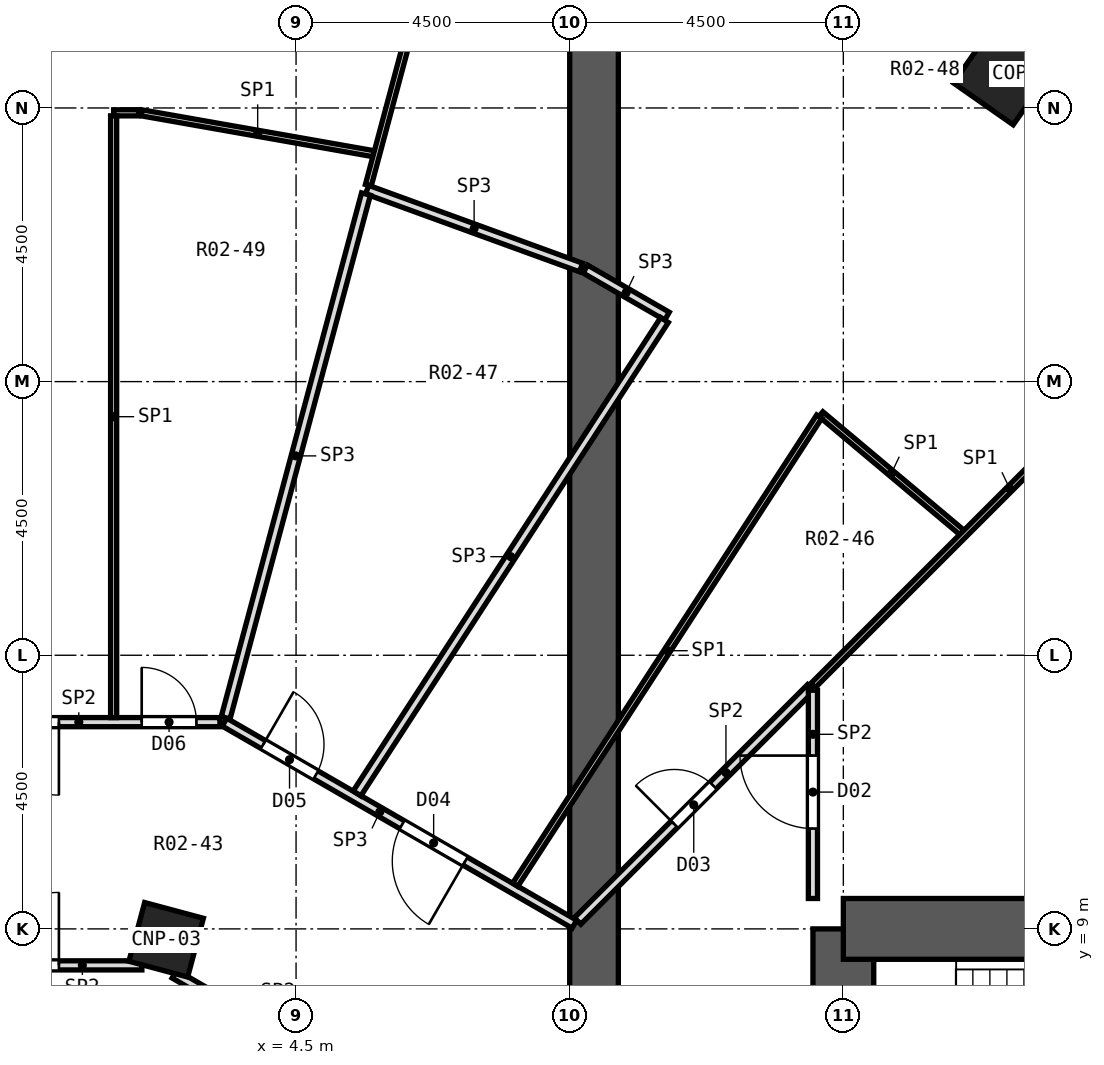
"""IFC4 building model, lengths in metres.
Left out: names, types, materials, properties, quantities, classifications, styles, units other than length and angle.
Written with IfcOpenShell. Run it as: python <this file> out.ifc"""

import sys

from ifc_helpers import new_model, si_unit, direction, frame, frame_2d, origin, origin_2d, place, context, subcontext, project, spatial, rectangle, extrude, element, fill, save


model = new_model("IFC4")
c1 = context("Model", 3, precision=1e-05, world=origin(), true_north=direction((0.0, 1.0)))
c2 = subcontext(c1, "Body", "Model", "MODEL_VIEW")
j1 = project(units=[si_unit("LENGTHUNIT", "METRE"), si_unit("PLANEANGLEUNIT", "RADIAN")], contexts=[c1])
p1 = place(None, origin())
s1 = spatial("IfcSite", under=j1, at=p1, CompositionType="ELEMENT")
p2 = place(p1, origin())
s2 = spatial("IfcBuilding", under=s1, at=p2, CompositionType="ELEMENT")
p3 = place(p2, frame((0.0, 0.0, -4.5)))
s3 = spatial("IfcBuildingStorey", under=s2, at=p3, CompositionType="ELEMENT", Elevation=-4.5)
p4 = place(p3, frame((16.146, 23.059, 0.0), z_axis=(0.0, 0.0, 1.0), x_axis=(0.573576436351, 0.819152044289, 0.0)))
e1 = element("IfcColumn", 1, at=p4, inside=s3, PredefinedType="COLUMN", context=c2, shape_type="SweptSolid", body=[
    extrude(rectangle(XDim=1.2, YDim=1.2, at=origin_2d()), origin(), (0.0, 0.0, 1.0), 4.5),
])
p5 = place(p3, frame((2.364, 8.821, 0.0), z_axis=(0.0, 0.0, 1.0), x_axis=(0.258819045103, 0.965925826289, 0.0)))
e2 = element("IfcColumn", 2, at=p5, inside=s3, PredefinedType="COLUMN", context=c2, shape_type="SweptSolid", body=[
    extrude(rectangle(XDim=1.0, YDim=1.0, at=origin_2d()), origin(), (0.0, 0.0, 1.0), 4.5),
])
p6 = place(p3, frame((13.5, -9.0, 0.0), z_axis=(0.0, 0.0, 1.0), x_axis=(0.0, 1.0, 0.0)))
e3 = element("IfcWall", 3, at=p6, inside=s3, PredefinedType="SHEAR", context=c2, shape_type="SweptSolid", body=[
    extrude(rectangle(XDim=18.0, YDim=1.0, at=frame_2d((9.0, 0.0))), origin(), (0.0, 0.0, 1.0), 4.5),
])
p7 = place(p6, frame((15.4, 0.0, 0.0)))
e4 = element("IfcOpeningElement", 4, at=p7, cuts=e3, PredefinedType="OPENING", context=c2, shape_type="SweptSolid", body=[
    extrude(rectangle(XDim=1.2, YDim=2.1, at=frame_2d((0.6, 1.05))), frame((0.0, 0.512, 0.0), z_axis=(0.0, -1.0, 0.0), x_axis=(1.0, 0.0, 0.0)), (0.0, 0.0, 1.0), 1.024),
])
p8 = place(p6, frame((1.4, 0.0, 0.0)))
e5 = element("IfcOpeningElement", 5, at=p8, cuts=e3, PredefinedType="OPENING", context=c2, shape_type="SweptSolid", body=[
    extrude(rectangle(XDim=1.2, YDim=2.1, at=frame_2d((0.6, 1.05))), frame((0.0, 0.512, 0.0), z_axis=(0.0, -1.0, 0.0), x_axis=(1.0, 0.0, 0.0)), (0.0, 0.0, 1.0), 1.024),
])
p9 = place(p6, frame((7.5, 0.0, 0.0)))
e6 = element("IfcOpeningElement", 6, at=p9, cuts=e3, PredefinedType="OPENING", context=c2, shape_type="SweptSolid", body=[
    extrude(rectangle(XDim=3.0, YDim=2.4, at=frame_2d((1.5, 1.2))), frame((0.0, 0.512, 0.0), z_axis=(0.0, -1.0, 0.0), x_axis=(1.0, 0.0, 0.0)), (0.0, 0.0, 1.0), 1.024),
])
p10 = place(p3, frame((13.5, 9.0, 0.0), z_axis=(0.0, 0.0, 1.0), x_axis=(1.0, 0.0, 0.0)))
e7 = element("IfcWall", 7, at=p10, inside=s3, PredefinedType="SHEAR", context=c2, shape_type="SweptSolid", body=[
    extrude(rectangle(XDim=12.4, YDim=1.0, at=frame_2d((6.2, 0.0))), origin(), (0.0, 0.0, 1.0), 4.5),
])
p11 = place(p3, frame((9.4, -27.077, 0.0), z_axis=(0.0, 0.0, 1.0), x_axis=(0.0, 1.0, 0.0)))
e8 = element("IfcWall", 8, at=p11, inside=s3, PredefinedType="SHEAR", context=c2, shape_type="SweptSolid", body=[
    extrude(rectangle(XDim=54.154, YDim=0.8, at=frame_2d((27.077, 0.0))), origin(), (0.0, 0.0, 1.0), 4.5),
])
p12 = place(p3, frame((13.131, 17.466, 0.0), z_axis=(0.0, 0.0, 1.0), x_axis=(0.765962197231, -0.642885613786, 0.0)))
e9 = element("IfcWall", 9, at=p12, inside=s3, PredefinedType="PARTITIONING", context=c2, shape_type="SweptSolid", body=[
    extrude(rectangle(XDim=3.027, YDim=0.1, at=frame_2d((1.514, 0.0))), origin(), (0.0, 0.0, 1.0), 3.95),
])
p13 = place(p3, frame((2.499, 8.257, 0.0), z_axis=(0.0, 0.0, 1.0), x_axis=(0.865990036525, -0.500061252887, 0.0)))
e10 = element("IfcWall", 10, at=p13, inside=s3, PredefinedType="PARTITIONING", context=c2, shape_type="SweptSolid", body=[
    extrude(rectangle(XDim=3.93, YDim=0.15, at=frame_2d((1.965, 0.0))), origin(), (0.0, 0.0, 1.0), 3.95),
])
p14 = place(p3, frame((3.323, 12.4, 0.0), z_axis=(0.0, 0.0, 1.0), x_axis=(0.865961614908, -0.500110469302, 0.0)))
e11 = element("IfcWall", 11, at=p14, inside=s3, PredefinedType="PARTITIONING", context=c2, shape_type="SweptSolid", body=[
    extrude(rectangle(XDim=6.645, YDim=0.15, at=frame_2d((3.322, 0.0))), origin(), (0.0, 0.0, 1.0), 3.95),
])
p15 = place(p14, frame((3.372, 0.0, 0.0)))
e12 = element("IfcOpeningElement", 12, at=p15, cuts=e11, PredefinedType="OPENING", context=c2, shape_type="SweptSolid", body=[
    extrude(rectangle(XDim=1.2, YDim=2.1, at=frame_2d((0.6, 1.05))), frame((0.0, 0.087, 0.0), z_axis=(0.0, -1.0, 0.0), x_axis=(1.0, 0.0, 0.0)), (0.0, 0.0, 1.0), 0.174),
])
p16 = place(p14, frame((0.735, 0.0, 0.0)))
e13 = element("IfcOpeningElement", 13, at=p16, cuts=e11, PredefinedType="OPENING", context=c2, shape_type="SweptSolid", body=[
    extrude(rectangle(XDim=1.0, YDim=2.1, at=frame_2d((0.5, 1.05))), frame((0.0, 0.087, 0.0), z_axis=(0.0, -1.0, 0.0), x_axis=(1.0, 0.0, 0.0)), (0.0, 0.0, 1.0), 0.174),
])
p17 = place(p3, frame((9.257, 19.851, 0.0), z_axis=(0.0, 0.0, 1.0), x_axis=(0.866093831647, -0.499881460731, 0.0)))
e14 = element("IfcWall", 14, at=p17, inside=s3, PredefinedType="PARTITIONING", context=c2, shape_type="SweptSolid", body=[
    extrude(rectangle(XDim=1.551, YDim=0.15, at=frame_2d((0.775, 0.0))), origin(), (0.0, 0.0, 1.0), 3.95),
])
p18 = place(p3, frame((5.669, 21.157, 0.0), z_axis=(0.0, 0.0, 1.0), x_axis=(0.939694363407, -0.342015355476, 0.0)))
e15 = element("IfcWall", 15, at=p18, inside=s3, PredefinedType="PARTITIONING", context=c2, shape_type="SweptSolid", body=[
    extrude(rectangle(XDim=3.743, YDim=0.15, at=frame_2d((1.872, 0.0))), origin(), (0.0, 0.0, 1.0), 3.95),
])
p19 = place(p3, frame((1.961, 22.42, 0.0), z_axis=(0.0, 0.0, 1.0), x_axis=(0.984830477475, -0.173519251487, 0.0)))
e16 = element("IfcWall", 16, at=p19, inside=s3, PredefinedType="PARTITIONING", context=c2, shape_type="SweptSolid", body=[
    extrude(rectangle(XDim=3.874, YDim=0.1, at=frame_2d((1.937, 0.0))), origin(), (0.0, 0.0, 1.0), 3.95),
])
p20 = place(p3, frame((-1.964, 8.4, 0.0), z_axis=(0.0, 0.0, 1.0), x_axis=(1.0, 0.0, 0.0)))
e17 = element("IfcWall", 17, at=p20, inside=s3, PredefinedType="PARTITIONING", context=c2, shape_type="SweptSolid", body=[
    extrude(rectangle(XDim=3.929, YDim=0.15, at=frame_2d((1.964, 0.0))), origin(), (0.0, 0.0, 1.0), 3.95),
])
p21 = place(p20, frame((1.365, 0.0, 0.0)))
e18 = element("IfcOpeningElement", 18, at=p21, cuts=e17, PredefinedType="OPENING", context=c2, shape_type="SweptSolid", body=[
    extrude(rectangle(XDim=1.2, YDim=2.1, at=frame_2d((0.6, 1.05))), frame((0.0, 0.087, 0.0), z_axis=(0.0, -1.0, 0.0), x_axis=(1.0, 0.0, 0.0)), (0.0, 0.0, 1.0), 0.174),
])
p22 = place(p3, frame((-3.273, 12.4, 0.0), z_axis=(0.0, 0.0, 1.0), x_axis=(1.0, 0.0, 0.0)))
e19 = element("IfcWall", 19, at=p22, inside=s3, PredefinedType="PARTITIONING", context=c2, shape_type="SweptSolid", body=[
    extrude(rectangle(XDim=6.521, YDim=0.15, at=frame_2d((3.26, 0.0))), origin(), (0.0, 0.0, 1.0), 3.95),
])
p23 = place(p22, frame((5.235, 0.0, 0.0)))
e20 = element("IfcOpeningElement", 20, at=p23, cuts=e19, PredefinedType="OPENING", context=c2, shape_type="SweptSolid", body=[
    extrude(rectangle(XDim=0.9, YDim=2.1, at=frame_2d((0.45, 1.05))), frame((0.0, 0.087, 0.0), z_axis=(0.0, -1.0, 0.0), x_axis=(1.0, 0.0, 0.0)), (0.0, 0.0, 1.0), 0.174),
])
p24 = place(p22, frame((2.673, 0.0, 0.0)))
e21 = element("IfcOpeningElement", 21, at=p24, cuts=e19, PredefinedType="OPENING", context=c2, shape_type="SweptSolid", body=[
    extrude(rectangle(XDim=1.2, YDim=2.1, at=frame_2d((0.6, 1.05))), frame((0.0, 0.087, 0.0), z_axis=(0.0, -1.0, 0.0), x_axis=(1.0, 0.0, 0.0)), (0.0, 0.0, 1.0), 0.174),
])
p25 = place(p22, frame((0.412, 0.0, 0.0)))
e22 = element("IfcOpeningElement", 22, at=p25, cuts=e19, PredefinedType="OPENING", context=c2, shape_type="SweptSolid", body=[
    extrude(rectangle(XDim=0.9, YDim=2.1, at=frame_2d((0.45, 1.05))), frame((0.0, 0.087, 0.0), z_axis=(0.0, -1.0, 0.0), x_axis=(1.0, 0.0, 0.0)), (0.0, 0.0, 1.0), 0.174),
])
p26 = place(p3, frame((1.5, 22.42, 0.0), z_axis=(0.0, 0.0, 1.0), x_axis=(1.0, 0.0, 0.0)))
e23 = element("IfcWall", 23, at=p26, inside=s3, PredefinedType="PARTITIONING", context=c2, shape_type="SweptSolid", body=[
    extrude(rectangle(XDim=0.411, YDim=0.1, at=frame_2d((0.206, 0.0))), origin(), (0.0, 0.0, 1.0), 3.95),
])
p27 = place(p3, frame((13.0, 13.0, 0.0), z_axis=(0.0, 0.0, 1.0), x_axis=(0.707106781187, 0.707106781187, 0.0)))
e24 = element("IfcWall", 24, at=p27, inside=s3, PredefinedType="PARTITIONING", context=c2, shape_type="SweptSolid", body=[
    extrude(rectangle(XDim=9.155, YDim=0.1, at=frame_2d((4.578, 0.0))), origin(), (0.0, 0.0, 1.0), 3.95),
])
p28 = place(p3, frame((9.13, 9.13, 0.0), z_axis=(0.0, 0.0, 1.0), x_axis=(0.707106781187, 0.707106781187, 0.0)))
e25 = element("IfcWall", 25, at=p28, inside=s3, PredefinedType="PARTITIONING", context=c2, shape_type="SweptSolid", body=[
    extrude(rectangle(XDim=5.423, YDim=0.15, at=frame_2d((2.711, 0.0))), origin(), (0.0, 0.0, 1.0), 3.95),
])
p29 = place(p28, frame((2.251, 0.0, 0.0)))
e26 = element("IfcOpeningElement", 26, at=p29, cuts=e25, PredefinedType="OPENING", context=c2, shape_type="SweptSolid", body=[
    extrude(rectangle(XDim=0.9, YDim=2.1, at=frame_2d((0.45, 1.05))), frame((0.0, 0.087, 0.0), z_axis=(0.0, -1.0, 0.0), x_axis=(1.0, 0.0, 0.0)), (0.0, 0.0, 1.0), 0.174),
])
p30 = place(p3, frame((8.104, 9.725, 0.0), z_axis=(0.0, 0.0, 1.0), x_axis=(0.544649902599, 0.838663510354, 0.0)))
e27 = element("IfcWall", 27, at=p30, inside=s3, PredefinedType="PARTITIONING", context=c2, shape_type="SweptSolid", body=[
    extrude(rectangle(XDim=9.18, YDim=0.1, at=frame_2d((4.59, 0.0))), origin(), (0.0, 0.0, 1.0), 3.95),
])
p31 = place(p3, frame((5.503, 11.228, 0.0), z_axis=(0.0, 0.0, 1.0), x_axis=(0.5446582962, 0.838658059271, 0.0)))
e28 = element("IfcWall", 28, at=p31, inside=s3, PredefinedType="PARTITIONING", context=c2, shape_type="SweptSolid", body=[
    extrude(rectangle(XDim=9.283, YDim=0.15, at=frame_2d((4.642, 0.0))), origin(), (0.0, 0.0, 1.0), 3.95),
])
p32 = place(p3, frame((5.688, 21.229, 0.0), z_axis=(0.0, 0.0, 1.0), x_axis=(0.258820927891, 0.965925321796, 0.0)))
e29 = element("IfcWall", 29, at=p32, inside=s3, PredefinedType="PARTITIONING", context=c2, shape_type="SweptSolid", body=[
    extrude(rectangle(XDim=5.562, YDim=0.1, at=frame_2d((2.781, 0.0))), origin(), (0.0, 0.0, 1.0), 3.95),
])
p33 = place(p3, frame((3.342, 12.472, 0.0), z_axis=(0.0, 0.0, 1.0), x_axis=(0.258789007971, 0.965933874214, 0.0)))
e30 = element("IfcWall", 30, at=p33, inside=s3, PredefinedType="PARTITIONING", context=c2, shape_type="SweptSolid", body=[
    extrude(rectangle(XDim=8.916, YDim=0.15, at=frame_2d((4.458, 0.0))), origin(), (0.0, 0.0, 1.0), 3.95),
])
p34 = place(p3, frame((13.0, 9.5, 0.0), z_axis=(0.0, 0.0, 1.0), x_axis=(0.0, 1.0, 0.0)))
e31 = element("IfcWall", 31, at=p34, inside=s3, PredefinedType="PARTITIONING", context=c2, shape_type="SweptSolid", body=[
    extrude(rectangle(XDim=3.425, YDim=0.15, at=frame_2d((1.712, 0.0))), origin(), (0.0, 0.0, 1.0), 3.95),
])
p35 = place(p34, frame((1.15, 0.0, 0.0)))
e32 = element("IfcOpeningElement", 32, at=p35, cuts=e31, PredefinedType="OPENING", context=c2, shape_type="SweptSolid", body=[
    extrude(rectangle(XDim=1.2, YDim=2.1, at=frame_2d((0.6, 1.05))), frame((0.0, 0.087, 0.0), z_axis=(0.0, -1.0, 0.0), x_axis=(1.0, 0.0, 0.0)), (0.0, 0.0, 1.0), 0.174),
])
p36 = place(p3, frame((1.5, 12.475, 0.0), z_axis=(0.0, 0.0, 1.0), x_axis=(0.0, 1.0, 0.0)))
e33 = element("IfcWall", 33, at=p36, inside=s3, PredefinedType="PARTITIONING", context=c2, shape_type="SweptSolid", body=[
    extrude(rectangle(XDim=9.895, YDim=0.1, at=frame_2d((4.948, 0.0))), origin(), (0.0, 0.0, 1.0), 3.95),
])
p37 = place(p35, origin())
e34 = element("IfcDoor", 34, at=p37, inside=s3, OperationType="SINGLE_SWING_RIGHT", PredefinedType="DOOR", context=c2, shape_type="SweptSolid", body=[
    extrude(rectangle(XDim=1.2, YDim=2.1, at=frame_2d((0.6, 1.05))), frame((0.0, 0.025, 0.0), z_axis=(0.0, -1.0, 0.0), x_axis=(1.0, 0.0, 0.0)), (0.0, 0.0, 1.0), 0.05),
])
fill(e32, e34)
p38 = place(p29, origin())
e35 = element("IfcDoor", 35, at=p38, inside=s3, OperationType="SINGLE_SWING_LEFT", PredefinedType="DOOR", context=c2, shape_type="SweptSolid", body=[
    extrude(rectangle(XDim=0.9, YDim=2.1, at=frame_2d((0.45, 1.05))), frame((0.0, 0.025, 0.0), z_axis=(0.0, -1.0, 0.0), x_axis=(1.0, 0.0, 0.0)), (0.0, 0.0, 1.0), 0.05),
])
fill(e26, e35)
p39 = place(p15, frame((1.2, 0.0, 0.0), z_axis=(0.0, 0.0, 1.0), x_axis=(-1.0, 0.0, 0.0)))
e36 = element("IfcDoor", 36, at=p39, inside=s3, OperationType="SINGLE_SWING_LEFT", PredefinedType="DOOR", context=c2, shape_type="SweptSolid", body=[
    extrude(rectangle(XDim=1.2, YDim=2.1, at=frame_2d((0.6, 1.05))), frame((0.0, 0.025, 0.0), z_axis=(0.0, -1.0, 0.0), x_axis=(1.0, 0.0, 0.0)), (0.0, 0.0, 1.0), 0.05),
])
fill(e12, e36)
p40 = place(p16, origin())
e37 = element("IfcDoor", 37, at=p40, inside=s3, OperationType="SINGLE_SWING_LEFT", PredefinedType="DOOR", context=c2, shape_type="SweptSolid", body=[
    extrude(rectangle(XDim=1.0, YDim=2.1, at=frame_2d((0.5, 1.05))), frame((0.0, 0.025, 0.0), z_axis=(0.0, -1.0, 0.0), x_axis=(1.0, 0.0, 0.0)), (0.0, 0.0, 1.0), 0.05),
])
fill(e13, e37)
p41 = place(p23, origin())
e38 = element("IfcDoor", 38, at=p41, inside=s3, OperationType="SINGLE_SWING_LEFT", PredefinedType="DOOR", context=c2, shape_type="SweptSolid", body=[
    extrude(rectangle(XDim=0.9, YDim=2.1, at=frame_2d((0.45, 1.05))), frame((0.0, 0.025, 0.0), z_axis=(0.0, -1.0, 0.0), x_axis=(1.0, 0.0, 0.0)), (0.0, 0.0, 1.0), 0.05),
])
fill(e20, e38)
p42 = place(p21, origin())
e39 = element("IfcDoor", 39, at=p42, inside=s3, OperationType="SINGLE_SWING_RIGHT", PredefinedType="DOOR", context=c2, shape_type="SweptSolid", body=[
    extrude(rectangle(XDim=1.2, YDim=2.1, at=frame_2d((0.6, 1.05))), frame((0.0, 0.025, 0.0), z_axis=(0.0, -1.0, 0.0), x_axis=(1.0, 0.0, 0.0)), (0.0, 0.0, 1.0), 0.05),
])
fill(e18, e39)
p43 = place(p24, frame((1.2, 0.0, 0.0), z_axis=(0.0, 0.0, 1.0), x_axis=(-1.0, 0.0, 0.0)))
e40 = element("IfcDoor", 40, at=p43, inside=s3, OperationType="SINGLE_SWING_LEFT", PredefinedType="DOOR", context=c2, shape_type="SweptSolid", body=[
    extrude(rectangle(XDim=1.2, YDim=2.1, at=frame_2d((0.6, 1.05))), frame((0.0, 0.025, 0.0), z_axis=(0.0, -1.0, 0.0), x_axis=(1.0, 0.0, 0.0)), (0.0, 0.0, 1.0), 0.05),
])
fill(e21, e40)
save(model, sys.argv[1])
